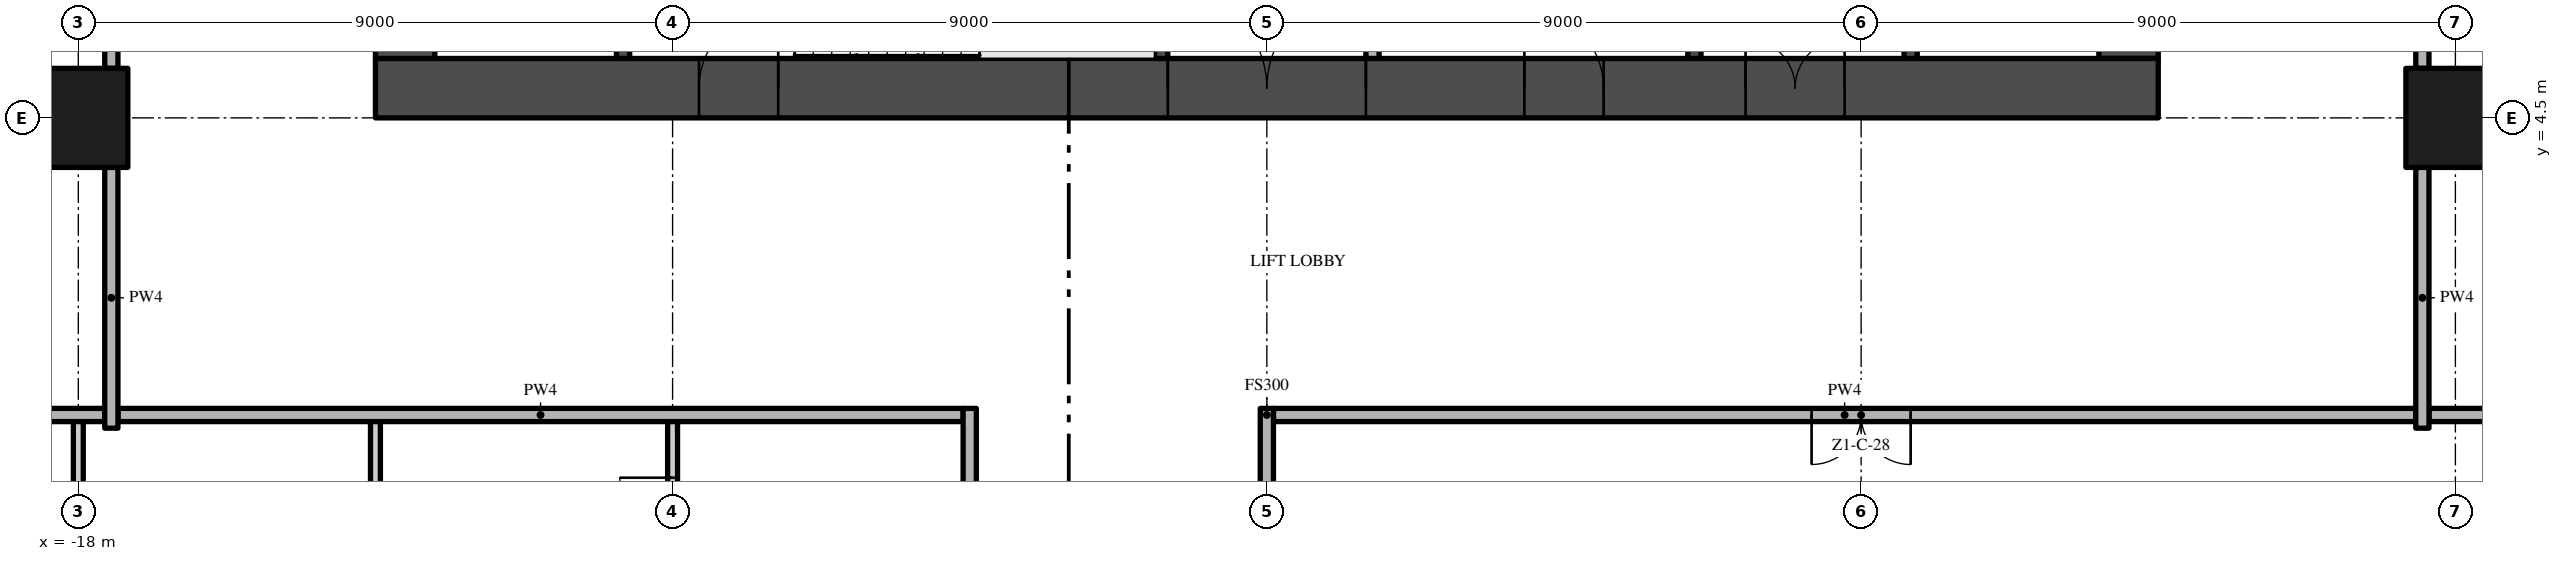
"""IFC4 building model, lengths in metres.
Left out: names, types, materials, properties, quantities, classifications, styles, units other than length and angle.
Written with IfcOpenShell. Run it as: python <this file> out.ifc"""

import sys

from ifc_helpers import new_model, si_unit, direction, frame, frame_2d, origin, origin_2d, place, context, subcontext, project, spatial, rectangle, extrude, element, fill, save


model = new_model("IFC4")
c1 = context("Model", 3, precision=1e-05, world=origin(), true_north=direction((0.0, 1.0)))
c2 = subcontext(c1, "Body", "Model", "MODEL_VIEW")
j1 = project(units=[si_unit("LENGTHUNIT", "METRE"), si_unit("PLANEANGLEUNIT", "RADIAN")], contexts=[c1])
p1 = place(None, origin())
s1 = spatial("IfcSite", under=j1, at=p1, CompositionType="ELEMENT")
p2 = place(p1, origin())
s2 = spatial("IfcBuilding", under=s1, at=p2, CompositionType="ELEMENT")
p3 = place(p2, frame((0.0, 0.0, 45.4)))
s3 = spatial("IfcBuildingStorey", under=s2, at=p3, CompositionType="ELEMENT", Elevation=45.4)
p4 = place(p3, frame((-13.5, 4.95, -0.3), z_axis=(0.0, 0.0, 1.0), x_axis=(1.0, 0.0, 0.0)))
e1 = element("IfcWall", 1, at=p4, inside=s3, PredefinedType="SHEAR", context=c2, shape_type="SweptSolid", body=[
    extrude(rectangle(XDim=27.0, YDim=0.9, at=frame_2d((13.5, 0.0))), origin(), (0.0, 0.0, 1.0), 3.8),
])
p5 = place(p4, frame((12.0, 0.0, 0.3)))
e2 = element("IfcOpeningElement", 2, at=p5, cuts=e1, PredefinedType="OPENING", context=c2, shape_type="SweptSolid", body=[
    extrude(rectangle(XDim=3.0, YDim=2.4, at=frame_2d((1.5, 1.2))), frame((0.0, 0.46, 0.0), z_axis=(0.0, -1.0, 0.0), x_axis=(1.0, 0.0, 0.0)), (0.0, 0.0, 1.0), 0.92),
])
p6 = place(p4, frame((4.9, 0.0, 0.3)))
e3 = element("IfcOpeningElement", 3, at=p6, cuts=e1, PredefinedType="OPENING", context=c2, shape_type="SweptSolid", body=[
    extrude(rectangle(XDim=1.2, YDim=2.2, at=frame_2d((0.6, 1.1))), frame((0.0, 0.46, 0.0), z_axis=(0.0, -1.0, 0.0), x_axis=(1.0, 0.0, 0.0)), (0.0, 0.0, 1.0), 0.92),
])
p7 = place(p4, frame((20.75, 0.0, 0.3)))
e4 = element("IfcOpeningElement", 4, at=p7, cuts=e1, PredefinedType="OPENING", context=c2, shape_type="SweptSolid", body=[
    extrude(rectangle(XDim=1.5, YDim=2.2, at=frame_2d((0.75, 1.1))), frame((0.0, 0.46, 0.0), z_axis=(0.0, -1.0, 0.0), x_axis=(1.0, 0.0, 0.0)), (0.0, 0.0, 1.0), 0.92),
])
p8 = place(p4, frame((17.4, 0.0, 0.3)))
e5 = element("IfcOpeningElement", 5, at=p8, cuts=e1, PredefinedType="OPENING", context=c2, shape_type="SweptSolid", body=[
    extrude(rectangle(XDim=1.2, YDim=2.2, at=frame_2d((0.6, 1.1))), frame((0.0, 0.46, 0.0), z_axis=(0.0, -1.0, 0.0), x_axis=(1.0, 0.0, 0.0)), (0.0, 0.0, 1.0), 0.92),
])
p9 = place(p3, frame((13.05, 5.4, -0.3), z_axis=(0.0, 0.0, 1.0), x_axis=(0.0, 1.0, 0.0)))
e6 = element("IfcWall", 6, at=p9, inside=s3, PredefinedType="SHEAR", context=c2, shape_type="SweptSolid", body=[
    extrude(rectangle(XDim=16.2, YDim=0.9, at=frame_2d((8.1, 0.0))), origin(), (0.0, 0.0, 1.0), 3.8),
])
p10 = place(p9, frame((6.0, 0.0, 0.3)))
e7 = element("IfcOpeningElement", 7, at=p10, cuts=e6, PredefinedType="OPENING", context=c2, shape_type="SweptSolid", body=[
    extrude(rectangle(XDim=1.2, YDim=2.2, at=frame_2d((0.6, 1.1))), frame((0.0, 0.46, 0.0), z_axis=(0.0, -1.0, 0.0), x_axis=(1.0, 0.0, 0.0)), (0.0, 0.0, 1.0), 0.92),
])
p11 = place(p3, frame((-13.05, 21.6, -0.3), z_axis=(0.0, 0.0, 1.0), x_axis=(0.0, -1.0, 0.0)))
e8 = element("IfcWall", 8, at=p11, inside=s3, PredefinedType="SHEAR", context=c2, shape_type="SweptSolid", body=[
    extrude(rectangle(XDim=16.2, YDim=0.9, at=frame_2d((8.1, 0.0))), origin(), (0.0, 0.0, 1.0), 3.8),
])
p12 = place(p11, frame((9.0, 0.0, 0.3)))
e9 = element("IfcOpeningElement", 9, at=p12, cuts=e8, PredefinedType="OPENING", context=c2, shape_type="SweptSolid", body=[
    extrude(rectangle(XDim=1.2, YDim=2.2, at=frame_2d((0.6, 1.1))), frame((0.0, 0.46, 0.0), z_axis=(0.0, -1.0, 0.0), x_axis=(1.0, 0.0, 0.0)), (0.0, 0.0, 1.0), 0.92),
])
for number, where, z_axis, x_axis in (
    (10, (-18.0, 4.5, 0.0), (0.0, 0.0, 1.0), (1.0, 0.0, 0.0)),
    (11, (18.0, 4.5, 0.0), (0.0, 0.0, 1.0), (1.0, 0.0, 0.0)),
):
    element("IfcColumn", number, at=place(p3, frame(where, z_axis=z_axis, x_axis=x_axis)), inside=s3, PredefinedType="COLUMN", context=c2, shape_type="SweptSolid", body=[
        extrude(rectangle(XDim=1.5, YDim=1.5, at=origin_2d()), origin(), (0.0, 0.0, 1.0), 3.5),
    ])
for number, where, z_axis, x_axis in (
    (12, (-9.75, 5.4, 0.0), (0.0, 0.0, 1.0), (0.0, 1.0, 0.0)),
    (13, (-1.6, 5.4, 0.0), (0.0, 0.0, 1.0), (0.0, 1.0, 0.0)),
):
    element("IfcWall", number, at=place(p3, frame(where, z_axis=z_axis, x_axis=x_axis)), inside=s3, PredefinedType="SHEAR", context=c2, shape_type="SweptSolid", body=[
        extrude(rectangle(XDim=2.55, YDim=0.2, at=frame_2d((1.275, 0.0))), origin(), (0.0, 0.0, 1.0), 3.5),
    ])
p13 = place(p3, frame((1.6, 7.5, 0.0), z_axis=(0.0, 0.0, 1.0), x_axis=(0.0, -1.0, 0.0)))
e14 = element("IfcWall", 14, at=p13, inside=s3, PredefinedType="PARTITIONING", context=c2, shape_type="SweptSolid", body=[
    extrude(rectangle(XDim=2.1, YDim=0.2, at=frame_2d((1.05, 0.0))), origin(), (0.0, 0.0, 1.0), 3.5),
])
p14 = place(p13, frame((0.25, 0.0, 0.0)))
e15 = element("IfcOpeningElement", 15, at=p14, cuts=e14, PredefinedType="OPENING", context=c2, shape_type="SweptSolid", body=[
    extrude(rectangle(XDim=0.9, YDim=2.1, at=frame_2d((0.45, 1.05))), frame((0.0, 0.11, 0.0), z_axis=(0.0, -1.0, 0.0), x_axis=(1.0, 0.0, 0.0)), (0.0, 0.0, 1.0), 0.22),
])
p15 = place(p3, frame((6.475, 5.4, 0.0), z_axis=(0.0, 0.0, 1.0), x_axis=(0.0, 1.0, 0.0)))
e16 = element("IfcWall", 16, at=p15, inside=s3, PredefinedType="SHEAR", context=c2, shape_type="SweptSolid", body=[
    extrude(rectangle(XDim=2.1, YDim=0.2, at=frame_2d((1.05, 0.0))), origin(), (0.0, 0.0, 1.0), 3.5),
])
p16 = place(p3, frame((9.75, 5.4, 0.0), z_axis=(0.0, 0.0, 1.0), x_axis=(0.0, 1.0, 0.0)))
e17 = element("IfcWall", 17, at=p16, inside=s3, PredefinedType="SHEAR", context=c2, shape_type="SweptSolid", body=[
    extrude(rectangle(XDim=2.2, YDim=0.2, at=frame_2d((1.1, 0.0))), origin(), (0.0, 0.0, 1.0), 3.5),
])
p17 = place(p16, frame((0.55, 0.0, 0.0)))
e18 = element("IfcOpeningElement", 18, at=p17, cuts=e17, PredefinedType="OPENING", context=c2, shape_type="SweptSolid", body=[
    extrude(rectangle(XDim=1.1, YDim=2.1, at=frame_2d((0.55, 1.05))), frame((0.0, 0.11, 0.0), z_axis=(0.0, -1.0, 0.0), x_axis=(1.0, 0.0, 0.0)), (0.0, 0.0, 1.0), 0.22),
])
p18 = place(p3, frame((-17.4, 0.0, 0.0), z_axis=(0.0, 0.0, 1.0), x_axis=(1.0, 0.0, 0.0)))
e19 = element("IfcWall", 19, at=p18, inside=s3, PredefinedType="PARTITIONING", context=c2, shape_type="SweptSolid", body=[
    extrude(rectangle(XDim=12.8, YDim=0.2, at=frame_2d((6.4, 0.0))), origin(), (0.0, 0.0, 1.0), 3.5),
])
p19 = place(p3, frame((17.4, 0.0, 0.0), z_axis=(0.0, 0.0, 1.0), x_axis=(-1.0, 0.0, 0.0)))
e20 = element("IfcWall", 20, at=p19, inside=s3, PredefinedType="PARTITIONING", context=c2, shape_type="SweptSolid", body=[
    extrude(rectangle(XDim=17.3, YDim=0.2, at=frame_2d((8.65, 0.0))), origin(), (0.0, 0.0, 1.0), 3.5),
])
p20 = place(p19, frame((7.65, 0.0, 0.0)))
e21 = element("IfcOpeningElement", 21, at=p20, cuts=e20, PredefinedType="OPENING", context=c2, shape_type="SweptSolid", body=[
    extrude(rectangle(XDim=1.5, YDim=2.4, at=frame_2d((0.75, 1.2))), frame((0.0, 0.11, 0.0), z_axis=(0.0, -1.0, 0.0), x_axis=(1.0, 0.0, 0.0)), (0.0, 0.0, 1.0), 0.22),
])
for number, where, z_axis, x_axis in (
    (22, (-26.7, 0.0, 0.0), (0.0, 0.0, 1.0), (1.0, 0.0, 0.0)),
    (23, (17.6, 0.0, 0.0), (0.0, 0.0, 1.0), (1.0, 0.0, 0.0)),
):
    element("IfcWall", number, at=place(p3, frame(where, z_axis=z_axis, x_axis=x_axis)), inside=s3, PredefinedType="PARTITIONING", context=c2, shape_type="SweptSolid", body=[
        extrude(rectangle(XDim=9.1, YDim=0.2, at=frame_2d((4.55, 0.0))), origin(), (0.0, 0.0, 1.0), 3.5),
    ])
p21 = place(p3, frame((-18.0, -3.75, 0.0), z_axis=(0.0, 0.0, 1.0), x_axis=(0.0, 1.0, 0.0)))
e24 = element("IfcWall", 24, at=p21, inside=s3, PredefinedType="PARTITIONING", context=c2, shape_type="SweptSolid", body=[
    extrude(rectangle(XDim=3.65, YDim=0.15, at=frame_2d((1.825, 0.0))), origin(), (0.0, 0.0, 1.0), 3.5),
])
p22 = place(p21, frame((1.0, 0.0, 0.0)))
e25 = element("IfcOpeningElement", 25, at=p22, cuts=e24, PredefinedType="OPENING", context=c2, shape_type="SweptSolid", body=[
    extrude(rectangle(XDim=1.0, YDim=2.4, at=frame_2d((0.5, 1.2))), frame((0.0, 0.085, 0.0), z_axis=(0.0, -1.0, 0.0), x_axis=(1.0, 0.0, 0.0)), (0.0, 0.0, 1.0), 0.17),
])
p23 = place(p3, frame((-17.5, -0.2, 0.0), z_axis=(0.0, 0.0, 1.0), x_axis=(0.0, 1.0, 0.0)))
e26 = element("IfcWall", 26, at=p23, inside=s3, PredefinedType="PARTITIONING", context=c2, shape_type="SweptSolid", body=[
    extrude(rectangle(XDim=3.95, YDim=0.2, at=frame_2d((1.975, 0.0))), origin(), (0.0, 0.0, 1.0), 3.5),
])
p24 = place(p3, frame((-17.5, 5.25, 0.0), z_axis=(0.0, 0.0, 1.0), x_axis=(0.0, 1.0, 0.0)))
e27 = element("IfcWall", 27, at=p24, inside=s3, PredefinedType="PARTITIONING", context=c2, shape_type="SweptSolid", body=[
    extrude(rectangle(XDim=7.5, YDim=0.2, at=frame_2d((3.75, 0.0))), origin(), (0.0, 0.0, 1.0), 3.5),
])
p25 = place(p24, frame((3.15, 0.0, 0.0)))
e28 = element("IfcOpeningElement", 28, at=p25, cuts=e27, PredefinedType="OPENING", context=c2, shape_type="SweptSolid", body=[
    extrude(rectangle(XDim=1.2, YDim=2.4, at=frame_2d((0.6, 1.2))), frame((0.0, 0.11, 0.0), z_axis=(0.0, -1.0, 0.0), x_axis=(1.0, 0.0, 0.0)), (0.0, 0.0, 1.0), 0.22),
])
p26 = place(p3, frame((-13.5, -0.1, 0.0), z_axis=(0.0, 0.0, 1.0), x_axis=(0.0, -1.0, 0.0)))
e29 = element("IfcWall", 29, at=p26, inside=s3, PredefinedType="PARTITIONING", context=c2, shape_type="SweptSolid", body=[
    extrude(rectangle(XDim=7.475, YDim=0.15, at=frame_2d((3.737, 0.0))), origin(), (0.0, 0.0, 1.0), 3.5),
])
p27 = place(p26, frame((3.1, 0.0, 0.0)))
e30 = element("IfcOpeningElement", 30, at=p27, cuts=e29, PredefinedType="OPENING", context=c2, shape_type="SweptSolid", body=[
    extrude(rectangle(XDim=0.8, YDim=2.0, at=frame_2d((0.4, 1.0))), frame((0.0, 0.085, 0.0), z_axis=(0.0, -1.0, 0.0), x_axis=(1.0, 0.0, 0.0)), (0.0, 0.0, 1.0), 0.17),
])
p28 = place(p3, frame((-9.0, -3.75, 0.0), z_axis=(0.0, 0.0, 1.0), x_axis=(0.0, 1.0, 0.0)))
e31 = element("IfcWall", 31, at=p28, inside=s3, PredefinedType="PARTITIONING", context=c2, shape_type="SweptSolid", body=[
    extrude(rectangle(XDim=3.65, YDim=0.15, at=frame_2d((1.825, 0.0))), origin(), (0.0, 0.0, 1.0), 3.5),
])
p29 = place(p28, frame((2.0, 0.0, 0.0)))
e32 = element("IfcOpeningElement", 32, at=p29, cuts=e31, PredefinedType="OPENING", context=c2, shape_type="SweptSolid", body=[
    extrude(rectangle(XDim=0.8, YDim=2.0, at=frame_2d((0.4, 1.0))), frame((0.0, 0.085, 0.0), z_axis=(0.0, -1.0, 0.0), x_axis=(1.0, 0.0, 0.0)), (0.0, 0.0, 1.0), 0.17),
])
p30 = place(p3, frame((-4.5, -22.2, 0.0), z_axis=(0.0, 0.0, 1.0), x_axis=(0.0, 1.0, 0.0)))
e33 = element("IfcWall", 33, at=p30, inside=s3, PredefinedType="PARTITIONING", context=c2, shape_type="SweptSolid", body=[
    extrude(rectangle(XDim=22.3, YDim=0.2, at=frame_2d((11.15, 0.0))), origin(), (0.0, 0.0, 1.0), 3.5),
])
p31 = place(p30, frame((10.2, 0.0, 0.0)))
e34 = element("IfcOpeningElement", 34, at=p31, cuts=e33, PredefinedType="OPENING", context=c2, shape_type="SweptSolid", body=[
    extrude(rectangle(XDim=1.5, YDim=2.4, at=frame_2d((0.75, 1.2))), frame((0.0, 0.11, 0.0), z_axis=(0.0, -1.0, 0.0), x_axis=(1.0, 0.0, 0.0)), (0.0, 0.0, 1.0), 0.22),
])
p32 = place(p3, frame((0.0, -3.75, 0.0), z_axis=(0.0, 0.0, 1.0), x_axis=(0.0, 1.0, 0.0)))
e35 = element("IfcWall", 35, at=p32, inside=s3, PredefinedType="PARTITIONING", context=c2, shape_type="SweptSolid", body=[
    extrude(rectangle(XDim=3.85, YDim=0.2, at=frame_2d((1.925, 0.0))), origin(), (0.0, 0.0, 1.0), 3.5),
])
p33 = place(p3, frame((17.5, -0.2, 0.0), z_axis=(0.0, 0.0, 1.0), x_axis=(0.0, 1.0, 0.0)))
e36 = element("IfcWall", 36, at=p33, inside=s3, PredefinedType="PARTITIONING", context=c2, shape_type="SweptSolid", body=[
    extrude(rectangle(XDim=3.95, YDim=0.2, at=frame_2d((1.975, 0.0))), origin(), (0.0, 0.0, 1.0), 3.5),
])
p34 = place(p3, frame((17.5, 12.75, 0.0), z_axis=(0.0, 0.0, 1.0), x_axis=(0.0, -1.0, 0.0)))
e37 = element("IfcWall", 37, at=p34, inside=s3, PredefinedType="PARTITIONING", context=c2, shape_type="SweptSolid", body=[
    extrude(rectangle(XDim=7.5, YDim=0.2, at=frame_2d((3.75, 0.0))), origin(), (0.0, 0.0, 1.0), 3.5),
])
p35 = place(p34, frame((3.15, 0.0, 0.0)))
e38 = element("IfcOpeningElement", 38, at=p35, cuts=e37, PredefinedType="OPENING", context=c2, shape_type="SweptSolid", body=[
    extrude(rectangle(XDim=1.2, YDim=2.4, at=frame_2d((0.6, 1.2))), frame((0.0, 0.11, 0.0), z_axis=(0.0, -1.0, 0.0), x_axis=(1.0, 0.0, 0.0)), (0.0, 0.0, 1.0), 0.22),
])
p36 = place(p5, frame((3.0, 0.0, 0.0), z_axis=(0.0, 0.0, 1.0), x_axis=(-1.0, 0.0, 0.0)))
e39 = element("IfcDoor", 39, at=p36, inside=s3, OperationType="DOUBLE_DOOR_SINGLE_SWING", PredefinedType="DOOR", context=c2, shape_type="SweptSolid", body=[
    extrude(rectangle(XDim=3.0, YDim=2.4, at=frame_2d((1.5, 1.2))), frame((0.0, 0.025, 0.0), z_axis=(0.0, -1.0, 0.0), x_axis=(1.0, 0.0, 0.0)), (0.0, 0.0, 1.0), 0.05),
])
fill(e2, e39)
p37 = place(p6, frame((1.2, 0.0, 0.0), z_axis=(0.0, 0.0, 1.0), x_axis=(-1.0, 0.0, 0.0)))
e40 = element("IfcDoor", 40, at=p37, inside=s3, OperationType="SINGLE_SWING_LEFT", PredefinedType="DOOR", context=c2, shape_type="SweptSolid", body=[
    extrude(rectangle(XDim=1.2, YDim=2.2, at=frame_2d((0.6, 1.1))), frame((0.0, 0.025, 0.0), z_axis=(0.0, -1.0, 0.0), x_axis=(1.0, 0.0, 0.0)), (0.0, 0.0, 1.0), 0.05),
])
fill(e3, e40)
p38 = place(p7, frame((1.5, 0.0, 0.0), z_axis=(0.0, 0.0, 1.0), x_axis=(-1.0, 0.0, 0.0)))
e41 = element("IfcDoor", 41, at=p38, inside=s3, OperationType="DOUBLE_DOOR_SINGLE_SWING", PredefinedType="DOOR", context=c2, shape_type="SweptSolid", body=[
    extrude(rectangle(XDim=1.5, YDim=2.2, at=frame_2d((0.75, 1.1))), frame((0.0, 0.025, 0.0), z_axis=(0.0, -1.0, 0.0), x_axis=(1.0, 0.0, 0.0)), (0.0, 0.0, 1.0), 0.05),
])
fill(e4, e41)
p39 = place(p8, frame((1.2, 0.0, 0.0), z_axis=(0.0, 0.0, 1.0), x_axis=(-1.0, 0.0, 0.0)))
e42 = element("IfcDoor", 42, at=p39, inside=s3, OperationType="SINGLE_SWING_RIGHT", PredefinedType="DOOR", context=c2, shape_type="SweptSolid", body=[
    extrude(rectangle(XDim=1.2, YDim=2.2, at=frame_2d((0.6, 1.1))), frame((0.0, 0.025, 0.0), z_axis=(0.0, -1.0, 0.0), x_axis=(1.0, 0.0, 0.0)), (0.0, 0.0, 1.0), 0.05),
])
fill(e5, e42)
p40 = place(p29, origin())
e43 = element("IfcDoor", 43, at=p40, inside=s3, OperationType="SINGLE_SWING_RIGHT", PredefinedType="DOOR", context=c2, shape_type="SweptSolid", body=[
    extrude(rectangle(XDim=0.8, YDim=2.0, at=frame_2d((0.4, 1.0))), frame((0.0, 0.025, 0.0), z_axis=(0.0, -1.0, 0.0), x_axis=(1.0, 0.0, 0.0)), (0.0, 0.0, 1.0), 0.05),
])
fill(e32, e43)
p41 = place(p20, origin())
e44 = element("IfcDoor", 44, at=p41, inside=s3, OperationType="DOUBLE_DOOR_SINGLE_SWING", PredefinedType="DOOR", context=c2, shape_type="SweptSolid", body=[
    extrude(rectangle(XDim=1.5, YDim=2.4, at=frame_2d((0.75, 1.2))), frame((0.0, 0.025, 0.0), z_axis=(0.0, -1.0, 0.0), x_axis=(1.0, 0.0, 0.0)), (0.0, 0.0, 1.0), 0.05),
])
fill(e21, e44)
save(model, sys.argv[1])
